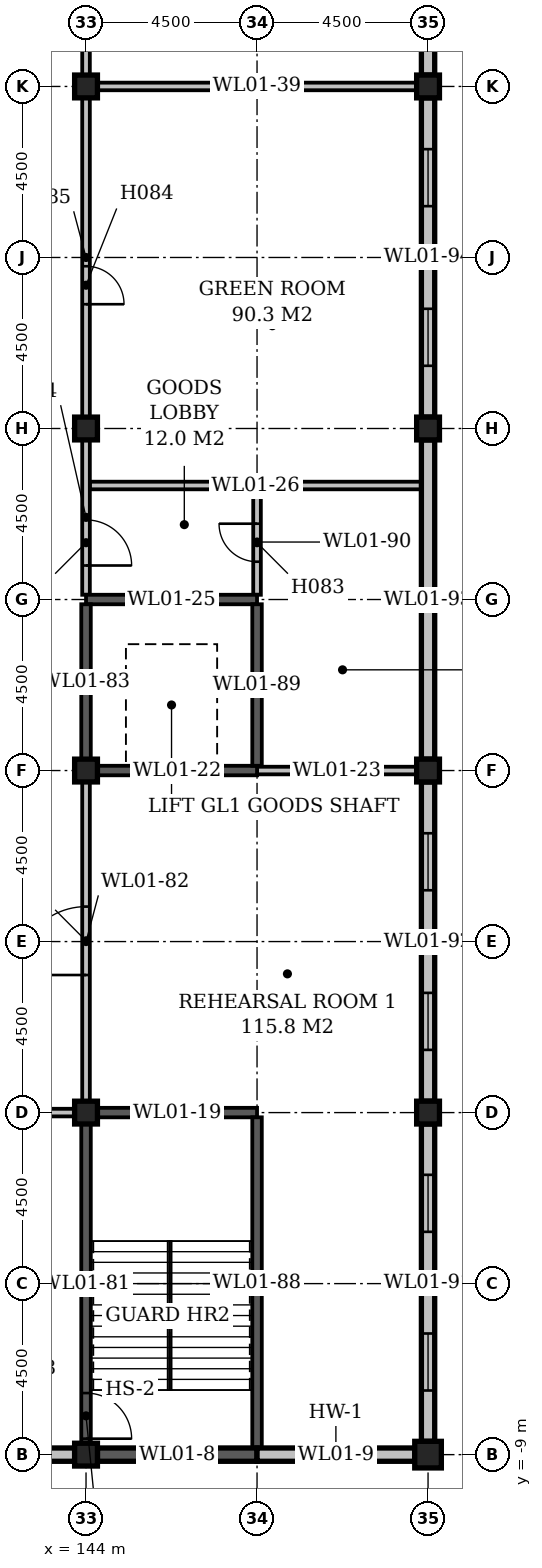
"""IFC4 building model, lengths in metres.
Left out: names, types, materials, properties, quantities, classifications, styles, units other than length and angle.
Written with IfcOpenShell. Run it as: python <this file> out.ifc"""

import sys

from ifc_helpers import new_model, si_unit, direction, frame, frame_2d, origin, origin_2d, place, context, subcontext, project, spatial, rectangle, extrude, element, fill, save


model = new_model("IFC4")
c1 = context("Model", 3, precision=1e-05, world=origin(), true_north=direction((0.0, 1.0)))
c2 = subcontext(c1, "Body", "Model", "MODEL_VIEW")
j1 = project(units=[si_unit("LENGTHUNIT", "METRE"), si_unit("PLANEANGLEUNIT", "RADIAN")], contexts=[c1])
p1 = place(None, origin())
s1 = spatial("IfcSite", under=j1, at=p1, CompositionType="ELEMENT")
p2 = place(p1, origin())
s2 = spatial("IfcBuilding", under=s1, at=p2, CompositionType="ELEMENT")
p3 = place(p2, frame((0.0, 0.0, 9.0)))
s3 = spatial("IfcBuildingStorey", under=s2, at=p3, CompositionType="ELEMENT", Elevation=9.0)
for number, where, z_axis, x_axis in (
    (1, (144.0, -9.0, 0.0), (0.0, 0.0, 1.0), (1.0, 0.0, 0.0)),
    (2, (144.0, 0.0, 0.0), (0.0, 0.0, 1.0), (1.0, 0.0, 0.0)),
    (3, (144.0, 9.0, 0.0), (0.0, 0.0, 1.0), (1.0, 0.0, 0.0)),
    (4, (144.0, 18.0, 0.0), (0.0, 0.0, 1.0), (1.0, 0.0, 0.0)),
    (5, (144.0, 27.0, 0.0), (0.0, 0.0, 1.0), (1.0, 0.0, 0.0)),
):
    element("IfcColumn", number, at=place(p3, frame(where, z_axis=z_axis, x_axis=x_axis)), inside=s3, PredefinedType="COLUMN", context=c2, shape_type="SweptSolid", body=[
        extrude(rectangle(XDim=0.6, YDim=0.6, at=origin_2d()), origin(), (0.0, 0.0, 1.0), 4.7),
    ])
p4 = place(p3, frame((153.0, -9.0, 0.0), z_axis=(0.0, 0.0, 1.0), x_axis=(1.0, 0.0, 0.0)))
e6 = element("IfcColumn", 6, at=p4, inside=s3, PredefinedType="COLUMN", context=c2, shape_type="SweptSolid", body=[
    extrude(rectangle(XDim=0.7, YDim=0.7, at=origin_2d()), origin(), (0.0, 0.0, 1.0), 4.7),
])
for number, where, z_axis, x_axis in (
    (7, (153.0, 0.0, 0.0), (0.0, 0.0, 1.0), (1.0, 0.0, 0.0)),
    (8, (153.0, 9.0, 0.0), (0.0, 0.0, 1.0), (1.0, 0.0, 0.0)),
    (9, (153.0, 18.0, 0.0), (0.0, 0.0, 1.0), (1.0, 0.0, 0.0)),
    (10, (153.0, 27.0, 0.0), (0.0, 0.0, 1.0), (1.0, 0.0, 0.0)),
):
    element("IfcColumn", number, at=place(p3, frame(where, z_axis=z_axis, x_axis=x_axis)), inside=s3, PredefinedType="COLUMN", context=c2, shape_type="SweptSolid", body=[
        extrude(rectangle(XDim=0.6, YDim=0.6, at=origin_2d()), origin(), (0.0, 0.0, 1.0), 4.7),
    ])
p5 = place(p3, frame((135.3, -9.0, 0.0), z_axis=(0.0, 0.0, 1.0), x_axis=(1.0, 0.0, 0.0)))
e11 = element("IfcWall", 11, at=p5, inside=s3, PredefinedType="STANDARD", context=c2, shape_type="SweptSolid", body=[
    extrude(rectangle(XDim=8.4, YDim=0.35, at=frame_2d((4.2, 0.0))), origin(), (0.0, 0.0, 1.0), 4.1),
])
p6 = place(p5, frame((1.35, 0.0, 1.0)))
e12 = element("IfcOpeningElement", 12, at=p6, cuts=e11, PredefinedType="OPENING", context=c2, shape_type="SweptSolid", body=[
    extrude(rectangle(XDim=1.5, YDim=2.4, at=frame_2d((0.75, 1.2))), frame((0.0, 0.187, 0.0), z_axis=(0.0, -1.0, 0.0), x_axis=(1.0, 0.0, 0.0)), (0.0, 0.0, 1.0), 0.374),
])
p7 = place(p3, frame((144.3, -9.0, 0.0), z_axis=(0.0, 0.0, 1.0), x_axis=(1.0, 0.0, 0.0)))
e13 = element("IfcWall", 13, at=p7, inside=s3, PredefinedType="STANDARD", context=c2, shape_type="SweptSolid", body=[
    extrude(rectangle(XDim=4.2, YDim=0.35, at=frame_2d((2.1, 0.0))), origin(), (0.0, 0.0, 1.0), 5.0),
])
p8 = place(p3, frame((148.5, -9.0, 0.0), z_axis=(0.0, 0.0, 1.0), x_axis=(1.0, 0.0, 0.0)))
e14 = element("IfcWall", 14, at=p8, inside=s3, PredefinedType="STANDARD", context=c2, shape_type="SweptSolid", body=[
    extrude(rectangle(XDim=4.15, YDim=0.35, at=frame_2d((2.075, 0.0))), origin(), (0.0, 0.0, 1.0), 4.1),
])
p9 = place(p8, frame((1.325, 0.0, 1.0)))
e15 = element("IfcOpeningElement", 15, at=p9, cuts=e14, PredefinedType="OPENING", context=c2, shape_type="SweptSolid", body=[
    extrude(rectangle(XDim=1.5, YDim=2.4, at=frame_2d((0.75, 1.2))), frame((0.0, 0.187, 0.0), z_axis=(0.0, -1.0, 0.0), x_axis=(1.0, 0.0, 0.0)), (0.0, 0.0, 1.0), 0.374),
])
p10 = place(p3, frame((135.4, 0.0, 0.0), z_axis=(0.0, 0.0, 1.0), x_axis=(1.0, 0.0, 0.0)))
e16 = element("IfcWall", 16, at=p10, inside=s3, PredefinedType="STANDARD", context=c2, shape_type="SweptSolid", body=[
    extrude(rectangle(XDim=8.3, YDim=0.2, at=frame_2d((4.15, 0.0))), origin(), (0.0, 0.0, 1.0), 4.7),
])
p11 = place(p10, frame((5.77, 0.0, 0.0)))
e17 = element("IfcOpeningElement", 17, at=p11, cuts=e16, PredefinedType="OPENING", context=c2, shape_type="SweptSolid", body=[
    extrude(rectangle(XDim=1.2, YDim=2.1, at=frame_2d((0.6, 1.05))), frame((0.0, 0.112, 0.0), z_axis=(0.0, -1.0, 0.0), x_axis=(1.0, 0.0, 0.0)), (0.0, 0.0, 1.0), 0.224),
])
p12 = place(p10, frame((1.37, 0.0, 0.0)))
e18 = element("IfcOpeningElement", 18, at=p12, cuts=e16, PredefinedType="OPENING", context=c2, shape_type="SweptSolid", body=[
    extrude(rectangle(XDim=1.0, YDim=2.1, at=frame_2d((0.5, 1.05))), frame((0.0, 0.112, 0.0), z_axis=(0.0, -1.0, 0.0), x_axis=(1.0, 0.0, 0.0)), (0.0, 0.0, 1.0), 0.224),
])
for number, where, z_axis, x_axis in (
    (19, (144.3, 0.0, 0.0), (0.0, 0.0, 1.0), (1.0, 0.0, 0.0)),
    (20, (144.3, 9.0, 0.0), (0.0, 0.0, 1.0), (1.0, 0.0, 0.0)),
):
    element("IfcWall", number, at=place(p3, frame(where, z_axis=z_axis, x_axis=x_axis)), inside=s3, PredefinedType="STANDARD", context=c2, shape_type="SweptSolid", body=[
        extrude(rectangle(XDim=4.2, YDim=0.25, at=frame_2d((2.1, 0.0))), origin(), (0.0, 0.0, 1.0), 5.0),
    ])
p13 = place(p3, frame((148.5, 9.0, 0.0), z_axis=(0.0, 0.0, 1.0), x_axis=(1.0, 0.0, 0.0)))
e21 = element("IfcWall", 21, at=p13, inside=s3, PredefinedType="STANDARD", context=c2, shape_type="SweptSolid", body=[
    extrude(rectangle(XDim=4.2, YDim=0.2, at=frame_2d((2.1, 0.0))), origin(), (0.0, 0.0, 1.0), 4.7),
])
p14 = place(p3, frame((144.0, 13.5, 0.0), z_axis=(0.0, 0.0, 1.0), x_axis=(1.0, 0.0, 0.0)))
e22 = element("IfcWall", 22, at=p14, inside=s3, PredefinedType="STANDARD", context=c2, shape_type="SweptSolid", body=[
    extrude(rectangle(XDim=4.5, YDim=0.25, at=frame_2d((2.25, 0.0))), origin(), (0.0, 0.0, 1.0), 5.0),
])
p15 = place(p14, frame((1.72, 0.0, 0.0)))
e23 = element("IfcOpeningElement", 23, at=p15, cuts=e22, PredefinedType="OPENING", context=c2, shape_type="SweptSolid", body=[
    extrude(rectangle(XDim=1.1, YDim=2.1, at=frame_2d((0.55, 1.05))), frame((0.0, 0.137, 0.0), z_axis=(0.0, -1.0, 0.0), x_axis=(1.0, 0.0, 0.0)), (0.0, 0.0, 1.0), 0.274),
])
p16 = place(p3, frame((144.1, 16.5, 0.0), z_axis=(0.0, 0.0, 1.0), x_axis=(1.0, 0.0, 0.0)))
e24 = element("IfcWall", 24, at=p16, inside=s3, PredefinedType="STANDARD", context=c2, shape_type="SweptSolid", body=[
    extrude(rectangle(XDim=8.725, YDim=0.2, at=frame_2d((4.362, 0.0))), origin(), (0.0, 0.0, 1.0), 4.7),
])
p17 = place(p3, frame((144.3, 27.0, 0.0), z_axis=(0.0, 0.0, 1.0), x_axis=(1.0, 0.0, 0.0)))
e25 = element("IfcWall", 25, at=p17, inside=s3, PredefinedType="STANDARD", context=c2, shape_type="SweptSolid", body=[
    extrude(rectangle(XDim=8.4, YDim=0.2, at=frame_2d((4.2, 0.0))), origin(), (0.0, 0.0, 1.0), 4.7),
])
p18 = place(p3, frame((144.0, -8.7, 0.0), z_axis=(0.0, 0.0, 1.0), x_axis=(0.0, 1.0, 0.0)))
e26 = element("IfcWall", 26, at=p18, inside=s3, PredefinedType="STANDARD", context=c2, shape_type="SweptSolid", body=[
    extrude(rectangle(XDim=8.4, YDim=0.25, at=frame_2d((4.2, 0.0))), origin(), (0.0, 0.0, 1.0), 5.0),
])
p19 = place(p18, frame((0.12, 0.0, 0.0)))
e27 = element("IfcOpeningElement", 27, at=p19, cuts=e26, PredefinedType="OPENING", context=c2, shape_type="SweptSolid", body=[
    extrude(rectangle(XDim=1.2, YDim=2.1, at=frame_2d((0.6, 1.05))), frame((0.0, 0.137, 0.0), z_axis=(0.0, -1.0, 0.0), x_axis=(1.0, 0.0, 0.0)), (0.0, 0.0, 1.0), 0.274),
])
p20 = place(p3, frame((144.0, 0.3, 0.0), z_axis=(0.0, 0.0, 1.0), x_axis=(0.0, 1.0, 0.0)))
e28 = element("IfcWall", 28, at=p20, inside=s3, PredefinedType="STANDARD", context=c2, shape_type="SweptSolid", body=[
    extrude(rectangle(XDim=8.4, YDim=0.2, at=frame_2d((4.2, 0.0))), origin(), (0.0, 0.0, 1.0), 4.7),
])
p21 = place(p20, frame((3.32, 0.0, 0.0)))
e29 = element("IfcOpeningElement", 29, at=p21, cuts=e28, PredefinedType="OPENING", context=c2, shape_type="SweptSolid", body=[
    extrude(rectangle(XDim=1.8, YDim=2.4, at=frame_2d((0.9, 1.2))), frame((0.0, 0.112, 0.0), z_axis=(0.0, -1.0, 0.0), x_axis=(1.0, 0.0, 0.0)), (0.0, 0.0, 1.0), 0.224),
])
p22 = place(p3, frame((144.0, 9.3, 0.0), z_axis=(0.0, 0.0, 1.0), x_axis=(0.0, 1.0, 0.0)))
e30 = element("IfcWall", 30, at=p22, inside=s3, PredefinedType="STANDARD", context=c2, shape_type="SweptSolid", body=[
    extrude(rectangle(XDim=4.075, YDim=0.25, at=frame_2d((2.038, 0.0))), origin(), (0.0, 0.0, 1.0), 5.0),
])
p23 = place(p3, frame((144.0, 13.625, 0.0), z_axis=(0.0, 0.0, 1.0), x_axis=(0.0, 1.0, 0.0)))
e31 = element("IfcWall", 31, at=p23, inside=s3, PredefinedType="STANDARD", context=c2, shape_type="SweptSolid", body=[
    extrude(rectangle(XDim=4.075, YDim=0.2, at=frame_2d((2.038, 0.0))), origin(), (0.0, 0.0, 1.0), 4.7),
])
p24 = place(p23, frame((0.77, 0.0, 0.0)))
e32 = element("IfcOpeningElement", 32, at=p24, cuts=e31, PredefinedType="OPENING", context=c2, shape_type="SweptSolid", body=[
    extrude(rectangle(XDim=1.2, YDim=2.1, at=frame_2d((0.6, 1.05))), frame((0.0, 0.112, 0.0), z_axis=(0.0, -1.0, 0.0), x_axis=(1.0, 0.0, 0.0)), (0.0, 0.0, 1.0), 0.224),
])
p25 = place(p3, frame((144.0, 18.3, 0.0), z_axis=(0.0, 0.0, 1.0), x_axis=(0.0, 1.0, 0.0)))
e33 = element("IfcWall", 33, at=p25, inside=s3, PredefinedType="STANDARD", context=c2, shape_type="SweptSolid", body=[
    extrude(rectangle(XDim=8.4, YDim=0.2, at=frame_2d((4.2, 0.0))), origin(), (0.0, 0.0, 1.0), 4.7),
])
p26 = place(p25, frame((2.97, 0.0, 0.0)))
e34 = element("IfcOpeningElement", 34, at=p26, cuts=e33, PredefinedType="OPENING", context=c2, shape_type="SweptSolid", body=[
    extrude(rectangle(XDim=1.0, YDim=2.1, at=frame_2d((0.5, 1.05))), frame((0.0, 0.112, 0.0), z_axis=(0.0, -1.0, 0.0), x_axis=(1.0, 0.0, 0.0)), (0.0, 0.0, 1.0), 0.224),
])
p27 = place(p3, frame((144.0, 27.3, 0.0), z_axis=(0.0, 0.0, 1.0), x_axis=(0.0, 1.0, 0.0)))
e35 = element("IfcWall", 35, at=p27, inside=s3, PredefinedType="STANDARD", context=c2, shape_type="SweptSolid", body=[
    extrude(rectangle(XDim=8.4, YDim=0.2, at=frame_2d((4.2, 0.0))), origin(), (0.0, 0.0, 1.0), 4.7),
])
p28 = place(p27, frame((3.32, 0.0, 0.0)))
e36 = element("IfcOpeningElement", 36, at=p28, cuts=e35, PredefinedType="OPENING", context=c2, shape_type="SweptSolid", body=[
    extrude(rectangle(XDim=1.8, YDim=2.4, at=frame_2d((0.9, 1.2))), frame((0.0, 0.112, 0.0), z_axis=(0.0, -1.0, 0.0), x_axis=(1.0, 0.0, 0.0)), (0.0, 0.0, 1.0), 0.224),
])
p29 = place(p3, frame((148.5, -8.825, 0.0), z_axis=(0.0, 0.0, 1.0), x_axis=(0.0, 1.0, 0.0)))
e37 = element("IfcWall", 37, at=p29, inside=s3, PredefinedType="STANDARD", context=c2, shape_type="SweptSolid", body=[
    extrude(rectangle(XDim=8.7, YDim=0.25, at=frame_2d((4.35, 0.0))), origin(), (0.0, 0.0, 1.0), 5.0),
])
p30 = place(p3, frame((148.5, 9.125, 0.0), z_axis=(0.0, 0.0, 1.0), x_axis=(0.0, 1.0, 0.0)))
e38 = element("IfcWall", 38, at=p30, inside=s3, PredefinedType="STANDARD", context=c2, shape_type="SweptSolid", body=[
    extrude(rectangle(XDim=4.25, YDim=0.25, at=frame_2d((2.125, 0.0))), origin(), (0.0, 0.0, 1.0), 5.0),
])
p31 = place(p3, frame((148.5, 13.625, 0.0), z_axis=(0.0, 0.0, 1.0), x_axis=(0.0, 1.0, 0.0)))
e39 = element("IfcWall", 39, at=p31, inside=s3, PredefinedType="STANDARD", context=c2, shape_type="SweptSolid", body=[
    extrude(rectangle(XDim=2.775, YDim=0.2, at=frame_2d((1.387, 0.0))), origin(), (0.0, 0.0, 1.0), 4.7),
])
p32 = place(p31, frame((0.87, 0.0, 0.0)))
e40 = element("IfcOpeningElement", 40, at=p32, cuts=e39, PredefinedType="OPENING", context=c2, shape_type="SweptSolid", body=[
    extrude(rectangle(XDim=1.0, YDim=2.1, at=frame_2d((0.5, 1.05))), frame((0.0, 0.112, 0.0), z_axis=(0.0, -1.0, 0.0), x_axis=(1.0, 0.0, 0.0)), (0.0, 0.0, 1.0), 0.224),
])
p33 = place(p3, frame((153.0, -8.65, 0.0), z_axis=(0.0, 0.0, 1.0), x_axis=(0.0, 1.0, 0.0)))
e41 = element("IfcWall", 41, at=p33, inside=s3, PredefinedType="STANDARD", context=c2, shape_type="SweptSolid", body=[
    extrude(rectangle(XDim=8.35, YDim=0.35, at=frame_2d((4.175, 0.0))), origin(), (0.0, 0.0, 1.0), 4.1),
])
p34 = place(p33, frame((1.337, 0.0, 1.0)))
e42 = element("IfcOpeningElement", 42, at=p34, cuts=e41, PredefinedType="OPENING", context=c2, shape_type="SweptSolid", body=[
    extrude(rectangle(XDim=1.5, YDim=2.4, at=frame_2d((0.75, 1.2))), frame((0.0, 0.187, 0.0), z_axis=(0.0, -1.0, 0.0), x_axis=(1.0, 0.0, 0.0)), (0.0, 0.0, 1.0), 0.374),
])
p35 = place(p33, frame((5.512, 0.0, 1.0)))
e43 = element("IfcOpeningElement", 43, at=p35, cuts=e41, PredefinedType="OPENING", context=c2, shape_type="SweptSolid", body=[
    extrude(rectangle(XDim=1.5, YDim=2.4, at=frame_2d((0.75, 1.2))), frame((0.0, 0.187, 0.0), z_axis=(0.0, -1.0, 0.0), x_axis=(1.0, 0.0, 0.0)), (0.0, 0.0, 1.0), 0.374),
])
p36 = place(p3, frame((153.0, 0.3, 0.0), z_axis=(0.0, 0.0, 1.0), x_axis=(0.0, 1.0, 0.0)))
e44 = element("IfcWall", 44, at=p36, inside=s3, PredefinedType="STANDARD", context=c2, shape_type="SweptSolid", body=[
    extrude(rectangle(XDim=8.4, YDim=0.35, at=frame_2d((4.2, 0.0))), origin(), (0.0, 0.0, 1.0), 4.1),
])
p37 = place(p36, frame((1.35, 0.0, 1.0)))
e45 = element("IfcOpeningElement", 45, at=p37, cuts=e44, PredefinedType="OPENING", context=c2, shape_type="SweptSolid", body=[
    extrude(rectangle(XDim=1.5, YDim=2.4, at=frame_2d((0.75, 1.2))), frame((0.0, 0.187, 0.0), z_axis=(0.0, -1.0, 0.0), x_axis=(1.0, 0.0, 0.0)), (0.0, 0.0, 1.0), 0.374),
])
p38 = place(p36, frame((5.55, 0.0, 1.0)))
e46 = element("IfcOpeningElement", 46, at=p38, cuts=e44, PredefinedType="OPENING", context=c2, shape_type="SweptSolid", body=[
    extrude(rectangle(XDim=1.5, YDim=2.4, at=frame_2d((0.75, 1.2))), frame((0.0, 0.187, 0.0), z_axis=(0.0, -1.0, 0.0), x_axis=(1.0, 0.0, 0.0)), (0.0, 0.0, 1.0), 0.374),
])
p39 = place(p3, frame((153.0, 9.3, 0.0), z_axis=(0.0, 0.0, 1.0), x_axis=(0.0, 1.0, 0.0)))
e47 = element("IfcWall", 47, at=p39, inside=s3, PredefinedType="STANDARD", context=c2, shape_type="SweptSolid", body=[
    extrude(rectangle(XDim=8.4, YDim=0.35, at=frame_2d((4.2, 0.0))), origin(), (0.0, 0.0, 1.0), 4.1),
])
p40 = place(p3, frame((153.0, 18.3, 0.0), z_axis=(0.0, 0.0, 1.0), x_axis=(0.0, 1.0, 0.0)))
e48 = element("IfcWall", 48, at=p40, inside=s3, PredefinedType="STANDARD", context=c2, shape_type="SweptSolid", body=[
    extrude(rectangle(XDim=8.4, YDim=0.35, at=frame_2d((4.2, 0.0))), origin(), (0.0, 0.0, 1.0), 4.1),
])
p41 = place(p40, frame((1.35, 0.0, 1.0)))
e49 = element("IfcOpeningElement", 49, at=p41, cuts=e48, PredefinedType="OPENING", context=c2, shape_type="SweptSolid", body=[
    extrude(rectangle(XDim=1.5, YDim=2.4, at=frame_2d((0.75, 1.2))), frame((0.0, 0.187, 0.0), z_axis=(0.0, -1.0, 0.0), x_axis=(1.0, 0.0, 0.0)), (0.0, 0.0, 1.0), 0.374),
])
p42 = place(p40, frame((5.55, 0.0, 1.0)))
e50 = element("IfcOpeningElement", 50, at=p42, cuts=e48, PredefinedType="OPENING", context=c2, shape_type="SweptSolid", body=[
    extrude(rectangle(XDim=1.5, YDim=2.4, at=frame_2d((0.75, 1.2))), frame((0.0, 0.187, 0.0), z_axis=(0.0, -1.0, 0.0), x_axis=(1.0, 0.0, 0.0)), (0.0, 0.0, 1.0), 0.374),
])
p43 = place(p3, frame((153.0, 27.3, 0.0), z_axis=(0.0, 0.0, 1.0), x_axis=(0.0, 1.0, 0.0)))
e51 = element("IfcWall", 51, at=p43, inside=s3, PredefinedType="STANDARD", context=c2, shape_type="SweptSolid", body=[
    extrude(rectangle(XDim=8.4, YDim=0.35, at=frame_2d((4.2, 0.0))), origin(), (0.0, 0.0, 1.0), 4.1),
])
p44 = place(p43, frame((1.35, 0.0, 1.0)))
e52 = element("IfcOpeningElement", 52, at=p44, cuts=e51, PredefinedType="OPENING", context=c2, shape_type="SweptSolid", body=[
    extrude(rectangle(XDim=1.5, YDim=2.4, at=frame_2d((0.75, 1.2))), frame((0.0, 0.187, 0.0), z_axis=(0.0, -1.0, 0.0), x_axis=(1.0, 0.0, 0.0)), (0.0, 0.0, 1.0), 0.374),
])
p45 = place(p43, frame((5.55, 0.0, 1.0)))
e53 = element("IfcOpeningElement", 53, at=p45, cuts=e51, PredefinedType="OPENING", context=c2, shape_type="SweptSolid", body=[
    extrude(rectangle(XDim=1.5, YDim=2.4, at=frame_2d((0.75, 1.2))), frame((0.0, 0.187, 0.0), z_axis=(0.0, -1.0, 0.0), x_axis=(1.0, 0.0, 0.0)), (0.0, 0.0, 1.0), 0.374),
])
p46 = place(p24, frame((1.2, 0.0, 0.0), z_axis=(0.0, 0.0, 1.0), x_axis=(-1.0, 0.0, 0.0)))
e54 = element("IfcDoor", 54, at=p46, inside=s3, OperationType="SINGLE_SWING_RIGHT", PredefinedType="DOOR", context=c2, shape_type="SweptSolid", body=[
    extrude(rectangle(XDim=1.2, YDim=2.1, at=frame_2d((0.6, 1.05))), frame((0.0, 0.025, 0.0), z_axis=(0.0, -1.0, 0.0), x_axis=(1.0, 0.0, 0.0)), (0.0, 0.0, 1.0), 0.05),
])
fill(e32, e54)
p47 = place(p19, frame((1.2, 0.0, 0.0), z_axis=(0.0, 0.0, 1.0), x_axis=(-1.0, 0.0, 0.0)))
e55 = element("IfcDoor", 55, at=p47, inside=s3, OperationType="SINGLE_SWING_RIGHT", PredefinedType="DOOR", context=c2, shape_type="SweptSolid", body=[
    extrude(rectangle(XDim=1.2, YDim=2.1, at=frame_2d((0.6, 1.05))), frame((0.0, 0.025, 0.0), z_axis=(0.0, -1.0, 0.0), x_axis=(1.0, 0.0, 0.0)), (0.0, 0.0, 1.0), 0.05),
])
fill(e27, e55)
p48 = place(p21, origin())
e56 = element("IfcDoor", 56, at=p48, inside=s3, OperationType="DOUBLE_DOOR_SINGLE_SWING", PredefinedType="DOOR", context=c2, shape_type="SweptSolid", body=[
    extrude(rectangle(XDim=1.8, YDim=2.4, at=frame_2d((0.9, 1.2))), frame((0.0, 0.025, 0.0), z_axis=(0.0, -1.0, 0.0), x_axis=(1.0, 0.0, 0.0)), (0.0, 0.0, 1.0), 0.05),
])
fill(e29, e56)
p49 = place(p32, frame((1.0, 0.0, 0.0), z_axis=(0.0, 0.0, 1.0), x_axis=(-1.0, 0.0, 0.0)))
e57 = element("IfcDoor", 57, at=p49, inside=s3, OperationType="SINGLE_SWING_LEFT", PredefinedType="DOOR", context=c2, shape_type="SweptSolid", body=[
    extrude(rectangle(XDim=1.0, YDim=2.1, at=frame_2d((0.5, 1.05))), frame((0.0, 0.025, 0.0), z_axis=(0.0, -1.0, 0.0), x_axis=(1.0, 0.0, 0.0)), (0.0, 0.0, 1.0), 0.05),
])
fill(e40, e57)
p50 = place(p26, frame((1.0, 0.0, 0.0), z_axis=(0.0, 0.0, 1.0), x_axis=(-1.0, 0.0, 0.0)))
e58 = element("IfcDoor", 58, at=p50, inside=s3, OperationType="SINGLE_SWING_RIGHT", PredefinedType="DOOR", context=c2, shape_type="SweptSolid", body=[
    extrude(rectangle(XDim=1.0, YDim=2.1, at=frame_2d((0.5, 1.05))), frame((0.0, 0.025, 0.0), z_axis=(0.0, -1.0, 0.0), x_axis=(1.0, 0.0, 0.0)), (0.0, 0.0, 1.0), 0.05),
])
fill(e34, e58)
p51 = place(p15, origin())
e59 = element("IfcDoor", 59, at=p51, inside=s3, OperationType="SLIDING_TO_LEFT", PredefinedType="DOOR", context=c2, shape_type="SweptSolid", body=[
    extrude(rectangle(XDim=1.1, YDim=2.1, at=frame_2d((0.55, 1.05))), frame((0.0, 0.025, 0.0), z_axis=(0.0, -1.0, 0.0), x_axis=(1.0, 0.0, 0.0)), (0.0, 0.0, 1.0), 0.05),
])
fill(e23, e59)
p52 = place(p9, origin())
e60 = element("IfcWindow", 60, at=p52, inside=s3, PartitioningType="SINGLE_PANEL", PredefinedType="WINDOW", context=c2, shape_type="SweptSolid", body=[
    extrude(rectangle(XDim=1.5, YDim=2.4, at=frame_2d((0.75, 1.2))), frame((0.0, 0.03, 0.0), z_axis=(0.0, -1.0, 0.0), x_axis=(1.0, 0.0, 0.0)), (0.0, 0.0, 1.0), 0.06),
])
fill(e15, e60)
p53 = place(p34, origin())
e61 = element("IfcWindow", 61, at=p53, inside=s3, PartitioningType="SINGLE_PANEL", PredefinedType="WINDOW", context=c2, shape_type="SweptSolid", body=[
    extrude(rectangle(XDim=1.5, YDim=2.4, at=frame_2d((0.75, 1.2))), frame((0.0, 0.03, 0.0), z_axis=(0.0, -1.0, 0.0), x_axis=(1.0, 0.0, 0.0)), (0.0, 0.0, 1.0), 0.06),
])
fill(e42, e61)
p54 = place(p35, origin())
e62 = element("IfcWindow", 62, at=p54, inside=s3, PartitioningType="SINGLE_PANEL", PredefinedType="WINDOW", context=c2, shape_type="SweptSolid", body=[
    extrude(rectangle(XDim=1.5, YDim=2.4, at=frame_2d((0.75, 1.2))), frame((0.0, 0.03, 0.0), z_axis=(0.0, -1.0, 0.0), x_axis=(1.0, 0.0, 0.0)), (0.0, 0.0, 1.0), 0.06),
])
fill(e43, e62)
p55 = place(p37, origin())
e63 = element("IfcWindow", 63, at=p55, inside=s3, PartitioningType="SINGLE_PANEL", PredefinedType="WINDOW", context=c2, shape_type="SweptSolid", body=[
    extrude(rectangle(XDim=1.5, YDim=2.4, at=frame_2d((0.75, 1.2))), frame((0.0, 0.03, 0.0), z_axis=(0.0, -1.0, 0.0), x_axis=(1.0, 0.0, 0.0)), (0.0, 0.0, 1.0), 0.06),
])
fill(e45, e63)
p56 = place(p38, origin())
e64 = element("IfcWindow", 64, at=p56, inside=s3, PartitioningType="SINGLE_PANEL", PredefinedType="WINDOW", context=c2, shape_type="SweptSolid", body=[
    extrude(rectangle(XDim=1.5, YDim=2.4, at=frame_2d((0.75, 1.2))), frame((0.0, 0.03, 0.0), z_axis=(0.0, -1.0, 0.0), x_axis=(1.0, 0.0, 0.0)), (0.0, 0.0, 1.0), 0.06),
])
fill(e46, e64)
p57 = place(p41, origin())
e65 = element("IfcWindow", 65, at=p57, inside=s3, PartitioningType="SINGLE_PANEL", PredefinedType="WINDOW", context=c2, shape_type="SweptSolid", body=[
    extrude(rectangle(XDim=1.5, YDim=2.4, at=frame_2d((0.75, 1.2))), frame((0.0, 0.03, 0.0), z_axis=(0.0, -1.0, 0.0), x_axis=(1.0, 0.0, 0.0)), (0.0, 0.0, 1.0), 0.06),
])
fill(e49, e65)
p58 = place(p42, origin())
e66 = element("IfcWindow", 66, at=p58, inside=s3, PartitioningType="SINGLE_PANEL", PredefinedType="WINDOW", context=c2, shape_type="SweptSolid", body=[
    extrude(rectangle(XDim=1.5, YDim=2.4, at=frame_2d((0.75, 1.2))), frame((0.0, 0.03, 0.0), z_axis=(0.0, -1.0, 0.0), x_axis=(1.0, 0.0, 0.0)), (0.0, 0.0, 1.0), 0.06),
])
fill(e50, e66)
save(model, sys.argv[1])
